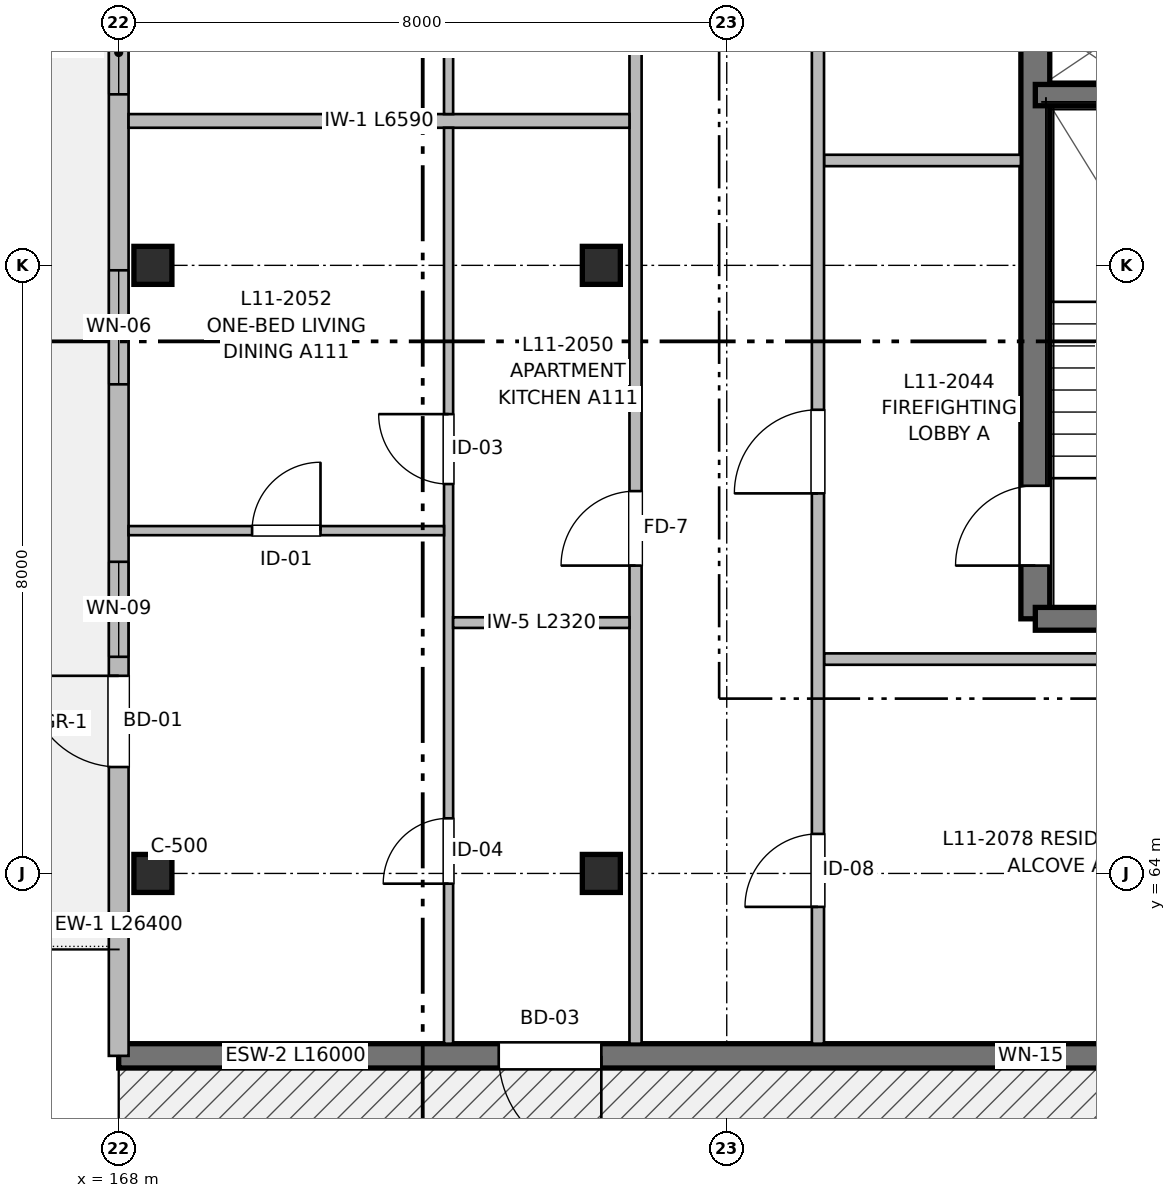
"""IFC4 building model, lengths in metres.
Left out: names, types, materials, properties, quantities, classifications, styles, units other than length and angle.
Written with IfcOpenShell. Run it as: python <this file> out.ifc"""

import sys

from ifc_helpers import new_model, si_unit, direction, frame, frame_2d, origin, origin_2d, place, context, subcontext, project, spatial, rectangle, extrude, element, fill, save


model = new_model("IFC4")
c1 = context("Model", 3, precision=1e-05, world=origin(), true_north=direction((0.0, 1.0)))
c2 = subcontext(c1, "Body", "Model", "MODEL_VIEW")
j1 = project(units=[si_unit("LENGTHUNIT", "METRE"), si_unit("PLANEANGLEUNIT", "RADIAN")], contexts=[c1])
p1 = place(None, origin())
s1 = spatial("IfcSite", under=j1, at=p1, CompositionType="ELEMENT")
p2 = place(p1, origin())
s2 = spatial("IfcBuilding", under=s1, at=p2, CompositionType="ELEMENT")
p3 = place(p2, frame((0.0, 0.0, 36.16)))
s3 = spatial("IfcBuildingStorey", under=s2, at=p3, CompositionType="ELEMENT", Elevation=36.16)
for number, where, z_axis, x_axis in (
    (1, (168.45, 64.0, 0.0), (0.0, 0.0, 1.0), (1.0, 0.0, 0.0)),
    (2, (168.45, 72.0, 0.0), (0.0, 0.0, 1.0), (1.0, 0.0, 0.0)),
    (3, (174.35, 64.0, 0.0), (0.0, 0.0, 1.0), (1.0, 0.0, 0.0)),
    (4, (174.35, 72.0, 0.0), (0.0, 0.0, 1.0), (1.0, 0.0, 0.0)),
):
    element("IfcColumn", number, at=place(p3, frame(where, z_axis=z_axis, x_axis=x_axis)), inside=s3, PredefinedType="COLUMN", context=c2, shape_type="SweptSolid", body=[
        extrude(rectangle(XDim=0.5, YDim=0.5, at=origin_2d()), origin(), (0.0, 0.0, 1.0), 3.2),
    ])
p4 = place(p3, frame((180.06, 67.35, 0.0), z_axis=(0.0, 0.0, 1.0), x_axis=(0.0, 1.0, 0.0)))
e5 = element("IfcWall", 5, at=p4, inside=s3, PredefinedType="SHEAR", context=c2, shape_type="SweptSolid", body=[
    extrude(rectangle(XDim=13.15, YDim=0.38, at=frame_2d((6.575, 0.0))), origin(), (0.0, 0.0, 1.0), 3.2),
])
p5 = place(p4, frame((0.7, 0.0, 0.0)))
e6 = element("IfcOpeningElement", 6, at=p5, cuts=e5, PredefinedType="OPENING", context=c2, shape_type="SweptSolid", body=[
    extrude(rectangle(XDim=1.05, YDim=2.15, at=frame_2d((0.525, 1.075))), frame((0.0, 0.2, 0.0), z_axis=(0.0, -1.0, 0.0), x_axis=(1.0, 0.0, 0.0)), (0.0, 0.0, 1.0), 0.4),
])
p6 = place(p3, frame((183.47, 67.35, 0.0), z_axis=(0.0, 0.0, 1.0), x_axis=(-1.0, 0.0, 0.0)))
e7 = element("IfcWall", 7, at=p6, inside=s3, PredefinedType="SHEAR", context=c2, shape_type="SweptSolid", body=[
    extrude(rectangle(XDim=3.41, YDim=0.3, at=frame_2d((1.705, 0.0))), origin(), (0.0, 0.0, 1.0), 3.2),
])
p7 = place(p3, frame((180.06, 74.24, 0.0), z_axis=(0.0, 0.0, 1.0), x_axis=(1.0, 0.0, 0.0)))
e8 = element("IfcWall", 8, at=p7, inside=s3, PredefinedType="SHEAR", context=c2, shape_type="SweptSolid", body=[
    extrude(rectangle(XDim=3.41, YDim=0.28, at=frame_2d((1.705, 0.0))), origin(), (0.0, 0.0, 1.0), 3.2),
])
p8 = place(p3, frame((184.0, 61.6, 0.0), z_axis=(0.0, 0.0, 1.0), x_axis=(-1.0, 0.0, 0.0)))
e9 = element("IfcWall", 9, at=p8, inside=s3, PredefinedType="SHEAR", context=c2, shape_type="SweptSolid", body=[
    extrude(rectangle(XDim=16.0, YDim=0.32, at=frame_2d((8.0, 0.0))), origin(), (0.0, 0.0, 1.0), 2.98),
])
p9 = place(p8, frame((9.65, 0.0, 0.0)))
e10 = element("IfcOpeningElement", 10, at=p9, cuts=e9, PredefinedType="OPENING", context=c2, shape_type="SweptSolid", body=[
    extrude(rectangle(XDim=1.35, YDim=2.2, at=frame_2d((0.675, 1.1))), frame((0.0, 0.17, 0.0), z_axis=(0.0, -1.0, 0.0), x_axis=(1.0, 0.0, 0.0)), (0.0, 0.0, 1.0), 0.34),
])
p10 = place(p8, frame((3.675, 0.0, 0.9)))
e11 = element("IfcOpeningElement", 11, at=p10, cuts=e9, PredefinedType="OPENING", context=c2, shape_type="SweptSolid", body=[
    extrude(rectangle(XDim=0.65, YDim=0.95, at=frame_2d((0.325, 0.475))), frame((0.0, 0.17, 0.0), z_axis=(0.0, -1.0, 0.0), x_axis=(1.0, 0.0, 0.0)), (0.0, 0.0, 1.0), 0.34),
])
p11 = place(p3, frame((168.0, 61.6, 0.0), z_axis=(0.0, 0.0, 1.0), x_axis=(0.0, 1.0, 0.0)))
e12 = element("IfcWall", 12, at=p11, inside=s3, PredefinedType="SOLIDWALL", context=c2, shape_type="SweptSolid", body=[
    extrude(rectangle(XDim=26.4, YDim=0.26, at=frame_2d((13.2, 0.0))), origin(), (0.0, 0.0, 1.0), 2.98),
])
p12 = place(p11, frame((3.8, 0.0, 0.0)))
e13 = element("IfcOpeningElement", 13, at=p12, cuts=e12, PredefinedType="OPENING", context=c2, shape_type="SweptSolid", body=[
    extrude(rectangle(XDim=1.2, YDim=2.2, at=frame_2d((0.6, 1.1))), frame((0.0, 0.14, 0.0), z_axis=(0.0, -1.0, 0.0), x_axis=(1.0, 0.0, 0.0)), (0.0, 0.0, 1.0), 0.28),
])
p13 = place(p11, frame((5.25, 0.0, 0.87)))
e14 = element("IfcOpeningElement", 14, at=p13, cuts=e12, PredefinedType="OPENING", context=c2, shape_type="SweptSolid", body=[
    extrude(rectangle(XDim=1.25, YDim=1.35, at=frame_2d((0.625, 0.675))), frame((0.0, 0.14, 0.0), z_axis=(0.0, -1.0, 0.0), x_axis=(1.0, 0.0, 0.0)), (0.0, 0.0, 1.0), 0.28),
])
p14 = place(p11, frame((12.65, 0.0, 0.62)))
e15 = element("IfcOpeningElement", 15, at=p14, cuts=e12, PredefinedType="OPENING", context=c2, shape_type="SweptSolid", body=[
    extrude(rectangle(XDim=1.1, YDim=1.6, at=frame_2d((0.55, 0.8))), frame((0.0, 0.14, 0.0), z_axis=(0.0, -1.0, 0.0), x_axis=(1.0, 0.0, 0.0)), (0.0, 0.0, 1.0), 0.28),
])
p15 = place(p11, frame((21.5, 0.0, 0.47)))
e16 = element("IfcOpeningElement", 16, at=p15, cuts=e12, PredefinedType="OPENING", context=c2, shape_type="SweptSolid", body=[
    extrude(rectangle(XDim=2.7, YDim=1.75, at=frame_2d((1.35, 0.875))), frame((0.0, 0.14, 0.0), z_axis=(0.0, -1.0, 0.0), x_axis=(1.0, 0.0, 0.0)), (0.0, 0.0, 1.0), 0.28),
])
p16 = place(p11, frame((8.835, 0.0, 0.82)))
e17 = element("IfcOpeningElement", 17, at=p16, cuts=e12, PredefinedType="OPENING", context=c2, shape_type="SweptSolid", body=[
    extrude(rectangle(XDim=1.5, YDim=1.4, at=frame_2d((0.75, 0.7))), frame((0.0, 0.14, 0.0), z_axis=(0.0, -1.0, 0.0), x_axis=(1.0, 0.0, 0.0)), (0.0, 0.0, 1.0), 0.28),
])
p17 = place(p11, frame((17.97, 0.0, 0.82)))
e18 = element("IfcOpeningElement", 18, at=p17, cuts=e12, PredefinedType="OPENING", context=c2, shape_type="SweptSolid", body=[
    extrude(rectangle(XDim=1.5, YDim=1.4, at=frame_2d((0.75, 0.7))), frame((0.0, 0.14, 0.0), z_axis=(0.0, -1.0, 0.0), x_axis=(1.0, 0.0, 0.0)), (0.0, 0.0, 1.0), 0.28),
])
p18 = place(p11, frame((25.275, 0.0, 0.9)))
e19 = element("IfcOpeningElement", 19, at=p18, cuts=e12, PredefinedType="OPENING", context=c2, shape_type="SweptSolid", body=[
    extrude(rectangle(XDim=0.65, YDim=0.95, at=frame_2d((0.325, 0.475))), frame((0.0, 0.14, 0.0), z_axis=(0.0, -1.0, 0.0), x_axis=(1.0, 0.0, 0.0)), (0.0, 0.0, 1.0), 0.28),
])
p19 = place(p3, frame((177.28, 66.82, 0.0), z_axis=(0.0, 0.0, 1.0), x_axis=(1.0, 0.0, 0.0)))
e20 = element("IfcWall", 20, at=p19, inside=s3, PredefinedType="PARTITIONING", context=c2, shape_type="SweptSolid", body=[
    extrude(rectangle(XDim=6.59, YDim=0.15, at=frame_2d((3.295, 0.0))), origin(), (0.0, 0.0, 1.0), 2.935),
])
p20 = place(p3, frame((177.28, 73.38, 0.0), z_axis=(0.0, 0.0, 1.0), x_axis=(1.0, 0.0, 0.0)))
e21 = element("IfcWall", 21, at=p20, inside=s3, PredefinedType="PARTITIONING", context=c2, shape_type="SweptSolid", body=[
    extrude(rectangle(XDim=2.59, YDim=0.15, at=frame_2d((1.295, 0.0))), origin(), (0.0, 0.0, 1.0), 2.935),
])
p21 = place(p3, frame((174.8, 61.76, 0.0), z_axis=(0.0, 0.0, 1.0), x_axis=(0.0, 1.0, 0.0)))
e22 = element("IfcWall", 22, at=p21, inside=s3, PredefinedType="PARTITIONING", context=c2, shape_type="SweptSolid", body=[
    extrude(rectangle(XDim=45.04, YDim=0.16, at=frame_2d((22.52, 0.0))), origin(), (0.0, 0.0, 1.0), 2.935),
])
p22 = place(p21, frame((6.29, 0.0, 0.0)))
e23 = element("IfcOpeningElement", 23, at=p22, cuts=e22, PredefinedType="OPENING", context=c2, shape_type="SweptSolid", body=[
    extrude(rectangle(XDim=0.98, YDim=2.15, at=frame_2d((0.49, 1.075))), frame((0.0, 0.09, 0.0), z_axis=(0.0, -1.0, 0.0), x_axis=(1.0, 0.0, 0.0)), (0.0, 0.0, 1.0), 0.18),
])
p23 = place(p21, frame((19.09, 0.0, 0.0)))
e24 = element("IfcOpeningElement", 24, at=p23, cuts=e22, PredefinedType="OPENING", context=c2, shape_type="SweptSolid", body=[
    extrude(rectangle(XDim=1.02, YDim=2.15, at=frame_2d((0.51, 1.075))), frame((0.0, 0.09, 0.0), z_axis=(0.0, -1.0, 0.0), x_axis=(1.0, 0.0, 0.0)), (0.0, 0.0, 1.0), 0.18),
])
p24 = place(p21, frame((30.04, 0.0, 0.0)))
e25 = element("IfcOpeningElement", 25, at=p24, cuts=e22, PredefinedType="OPENING", context=c2, shape_type="SweptSolid", body=[
    extrude(rectangle(XDim=0.98, YDim=2.15, at=frame_2d((0.49, 1.075))), frame((0.0, 0.09, 0.0), z_axis=(0.0, -1.0, 0.0), x_axis=(1.0, 0.0, 0.0)), (0.0, 0.0, 1.0), 0.18),
])
p25 = place(p21, frame((40.18, 0.0, 0.0)))
e26 = element("IfcOpeningElement", 26, at=p25, cuts=e22, PredefinedType="OPENING", context=c2, shape_type="SweptSolid", body=[
    extrude(rectangle(XDim=0.98, YDim=2.15, at=frame_2d((0.49, 1.075))), frame((0.0, 0.09, 0.0), z_axis=(0.0, -1.0, 0.0), x_axis=(1.0, 0.0, 0.0)), (0.0, 0.0, 1.0), 0.18),
])
p26 = place(p3, frame((177.2, 61.76, 0.0), z_axis=(0.0, 0.0, 1.0), x_axis=(0.0, 1.0, 0.0)))
e27 = element("IfcWall", 27, at=p26, inside=s3, PredefinedType="PARTITIONING", context=c2, shape_type="SweptSolid", body=[
    extrude(rectangle(XDim=45.04, YDim=0.16, at=frame_2d((22.52, 0.0))), origin(), (0.0, 0.0, 1.0), 2.935),
])
p27 = place(p26, frame((7.24, 0.0, 0.0)))
e28 = element("IfcOpeningElement", 28, at=p27, cuts=e27, PredefinedType="OPENING", context=c2, shape_type="SweptSolid", body=[
    extrude(rectangle(XDim=1.1, YDim=2.15, at=frame_2d((0.55, 1.075))), frame((0.0, 0.09, 0.0), z_axis=(0.0, -1.0, 0.0), x_axis=(1.0, 0.0, 0.0)), (0.0, 0.0, 1.0), 0.18),
])
p28 = place(p26, frame((13.64, 0.0, 0.0)))
e29 = element("IfcOpeningElement", 29, at=p28, cuts=e27, PredefinedType="OPENING", context=c2, shape_type="SweptSolid", body=[
    extrude(rectangle(XDim=1.6, YDim=2.15, at=frame_2d((0.8, 1.075))), frame((0.0, 0.09, 0.0), z_axis=(0.0, -1.0, 0.0), x_axis=(1.0, 0.0, 0.0)), (0.0, 0.0, 1.0), 0.18),
])
p29 = place(p26, frame((1.8, 0.0, 0.0)))
e30 = element("IfcOpeningElement", 30, at=p29, cuts=e27, PredefinedType="OPENING", context=c2, shape_type="SweptSolid", body=[
    extrude(rectangle(XDim=0.96, YDim=2.15, at=frame_2d((0.48, 1.075))), frame((0.0, 0.09, 0.0), z_axis=(0.0, -1.0, 0.0), x_axis=(1.0, 0.0, 0.0)), (0.0, 0.0, 1.0), 0.18),
])
p30 = place(p26, frame((27.57, 0.0, 0.0)))
e31 = element("IfcOpeningElement", 31, at=p30, cuts=e27, PredefinedType="OPENING", context=c2, shape_type="SweptSolid", body=[
    extrude(rectangle(XDim=0.98, YDim=2.15, at=frame_2d((0.49, 1.075))), frame((0.0, 0.09, 0.0), z_axis=(0.0, -1.0, 0.0), x_axis=(1.0, 0.0, 0.0)), (0.0, 0.0, 1.0), 0.18),
])
p31 = place(p26, frame((35.83, 0.0, 0.0)))
e32 = element("IfcOpeningElement", 32, at=p31, cuts=e27, PredefinedType="OPENING", context=c2, shape_type="SweptSolid", body=[
    extrude(rectangle(XDim=0.98, YDim=2.15, at=frame_2d((0.49, 1.075))), frame((0.0, 0.09, 0.0), z_axis=(0.0, -1.0, 0.0), x_axis=(1.0, 0.0, 0.0)), (0.0, 0.0, 1.0), 0.18),
])
p32 = place(p3, frame((168.13, 73.9, 0.0), z_axis=(0.0, 0.0, 1.0), x_axis=(1.0, 0.0, 0.0)))
e33 = element("IfcWall", 33, at=p32, inside=s3, PredefinedType="PARTITIONING", context=c2, shape_type="SweptSolid", body=[
    extrude(rectangle(XDim=6.59, YDim=0.18, at=frame_2d((3.295, 0.0))), origin(), (0.0, 0.0, 1.0), 2.935),
])
p33 = place(p3, frame((172.34, 61.76, 0.0), z_axis=(0.0, 0.0, 1.0), x_axis=(0.0, 1.0, 0.0)))
e34 = element("IfcWall", 34, at=p33, inside=s3, PredefinedType="PARTITIONING", context=c2, shape_type="SweptSolid", body=[
    extrude(rectangle(XDim=12.05, YDim=0.12, at=frame_2d((6.025, 0.0))), origin(), (0.0, 0.0, 1.0), 2.935),
])
p34 = place(p33, frame((2.105, 0.0, 0.0)))
e35 = element("IfcOpeningElement", 35, at=p34, cuts=e34, PredefinedType="OPENING", context=c2, shape_type="SweptSolid", body=[
    extrude(rectangle(XDim=0.86, YDim=2.1, at=frame_2d((0.43, 1.05))), frame((0.0, 0.07, 0.0), z_axis=(0.0, -1.0, 0.0), x_axis=(1.0, 0.0, 0.0)), (0.0, 0.0, 1.0), 0.14),
])
p35 = place(p33, frame((7.363, 0.0, 0.0)))
e36 = element("IfcOpeningElement", 36, at=p35, cuts=e34, PredefinedType="OPENING", context=c2, shape_type="SweptSolid", body=[
    extrude(rectangle(XDim=0.92, YDim=2.1, at=frame_2d((0.46, 1.05))), frame((0.0, 0.07, 0.0), z_axis=(0.0, -1.0, 0.0), x_axis=(1.0, 0.0, 0.0)), (0.0, 0.0, 1.0), 0.14),
])
p36 = place(p3, frame((172.4, 67.3, 0.0), z_axis=(0.0, 0.0, 1.0), x_axis=(1.0, 0.0, 0.0)))
e37 = element("IfcWall", 37, at=p36, inside=s3, PredefinedType="PARTITIONING", context=c2, shape_type="SweptSolid", body=[
    extrude(rectangle(XDim=2.32, YDim=0.14, at=frame_2d((1.16, 0.0))), origin(), (0.0, 0.0, 1.0), 2.935),
])
p37 = place(p3, frame((168.13, 68.51, 0.0), z_axis=(0.0, 0.0, 1.0), x_axis=(1.0, 0.0, 0.0)))
e38 = element("IfcWall", 38, at=p37, inside=s3, PredefinedType="PARTITIONING", context=c2, shape_type="SweptSolid", body=[
    extrude(rectangle(XDim=4.15, YDim=0.12, at=frame_2d((2.075, 0.0))), origin(), (0.0, 0.0, 1.0), 2.935),
])
p38 = place(p37, frame((1.625, 0.0, 0.0)))
e39 = element("IfcOpeningElement", 39, at=p38, cuts=e38, PredefinedType="OPENING", context=c2, shape_type="SweptSolid", body=[
    extrude(rectangle(XDim=0.9, YDim=2.1, at=frame_2d((0.45, 1.05))), frame((0.0, 0.07, 0.0), z_axis=(0.0, -1.0, 0.0), x_axis=(1.0, 0.0, 0.0)), (0.0, 0.0, 1.0), 0.14),
])
p39 = place(p3, frame((172.34, 73.99, 0.0), z_axis=(0.0, 0.0, 1.0), x_axis=(0.0, 1.0, 0.0)))
e40 = element("IfcWall", 40, at=p39, inside=s3, PredefinedType="PARTITIONING", context=c2, shape_type="SweptSolid", body=[
    extrude(rectangle(XDim=12.41, YDim=0.12, at=frame_2d((6.205, 0.0))), origin(), (0.0, 0.0, 1.0), 2.935),
])
p40 = place(p39, frame((2.17, 0.0, 0.0)))
e41 = element("IfcOpeningElement", 41, at=p40, cuts=e40, PredefinedType="OPENING", context=c2, shape_type="SweptSolid", body=[
    extrude(rectangle(XDim=0.94, YDim=2.1, at=frame_2d((0.47, 1.05))), frame((0.0, 0.07, 0.0), z_axis=(0.0, -1.0, 0.0), x_axis=(1.0, 0.0, 0.0)), (0.0, 0.0, 1.0), 0.14),
])
p41 = place(p39, frame((7.586, 0.0, 0.0)))
e42 = element("IfcOpeningElement", 42, at=p41, cuts=e40, PredefinedType="OPENING", context=c2, shape_type="SweptSolid", body=[
    extrude(rectangle(XDim=0.92, YDim=2.1, at=frame_2d((0.46, 1.05))), frame((0.0, 0.07, 0.0), z_axis=(0.0, -1.0, 0.0), x_axis=(1.0, 0.0, 0.0)), (0.0, 0.0, 1.0), 0.14),
])
p42 = place(p5, origin())
e43 = element("IfcDoor", 43, at=p42, inside=s3, OperationType="SINGLE_SWING_LEFT", PredefinedType="DOOR", context=c2, shape_type="SweptSolid", body=[
    extrude(rectangle(XDim=1.05, YDim=2.15, at=frame_2d((0.525, 1.075))), frame((0.0, 0.025, 0.0), z_axis=(0.0, -1.0, 0.0), x_axis=(1.0, 0.0, 0.0)), (0.0, 0.0, 1.0), 0.05),
])
fill(e6, e43)
p43 = place(p9, origin())
e44 = element("IfcDoor", 44, at=p43, inside=s3, OperationType="SINGLE_SWING_LEFT", PredefinedType="DOOR", context=c2, shape_type="SweptSolid", body=[
    extrude(rectangle(XDim=1.35, YDim=2.2, at=frame_2d((0.675, 1.1))), frame((0.0, 0.025, 0.0), z_axis=(0.0, -1.0, 0.0), x_axis=(1.0, 0.0, 0.0)), (0.0, 0.0, 1.0), 0.05),
])
fill(e10, e44)
p44 = place(p10, origin())
e45 = element("IfcWindow", 45, at=p44, inside=s3, PartitioningType="SINGLE_PANEL", PredefinedType="WINDOW", context=c2, shape_type="SweptSolid", body=[
    extrude(rectangle(XDim=0.65, YDim=0.95, at=frame_2d((0.325, 0.475))), frame((0.0, 0.03, 0.0), z_axis=(0.0, -1.0, 0.0), x_axis=(1.0, 0.0, 0.0)), (0.0, 0.0, 1.0), 0.06),
])
fill(e11, e45)
p45 = place(p12, origin())
e46 = element("IfcDoor", 46, at=p45, inside=s3, OperationType="SINGLE_SWING_RIGHT", PredefinedType="DOOR", context=c2, shape_type="SweptSolid", body=[
    extrude(rectangle(XDim=1.2, YDim=2.2, at=frame_2d((0.6, 1.1))), frame((0.0, 0.025, 0.0), z_axis=(0.0, -1.0, 0.0), x_axis=(1.0, 0.0, 0.0)), (0.0, 0.0, 1.0), 0.05),
])
fill(e13, e46)
p46 = place(p13, origin())
e47 = element("IfcWindow", 47, at=p46, inside=s3, PartitioningType="SINGLE_PANEL", PredefinedType="WINDOW", context=c2, shape_type="SweptSolid", body=[
    extrude(rectangle(XDim=1.25, YDim=1.35, at=frame_2d((0.625, 0.675))), frame((0.0, 0.03, 0.0), z_axis=(0.0, -1.0, 0.0), x_axis=(1.0, 0.0, 0.0)), (0.0, 0.0, 1.0), 0.06),
])
fill(e14, e47)
p47 = place(p14, origin())
e48 = element("IfcWindow", 48, at=p47, inside=s3, PartitioningType="SINGLE_PANEL", PredefinedType="WINDOW", context=c2, shape_type="SweptSolid", body=[
    extrude(rectangle(XDim=1.1, YDim=1.6, at=frame_2d((0.55, 0.8))), frame((0.0, 0.03, 0.0), z_axis=(0.0, -1.0, 0.0), x_axis=(1.0, 0.0, 0.0)), (0.0, 0.0, 1.0), 0.06),
])
fill(e15, e48)
p48 = place(p27, origin())
e49 = element("IfcDoor", 49, at=p48, inside=s3, OperationType="SINGLE_SWING_LEFT", PredefinedType="DOOR", context=c2, shape_type="SweptSolid", body=[
    extrude(rectangle(XDim=1.1, YDim=2.15, at=frame_2d((0.55, 1.075))), frame((0.0, 0.025, 0.0), z_axis=(0.0, -1.0, 0.0), x_axis=(1.0, 0.0, 0.0)), (0.0, 0.0, 1.0), 0.05),
])
fill(e28, e49)
p49 = place(p34, origin())
e50 = element("IfcDoor", 50, at=p49, inside=s3, OperationType="SINGLE_SWING_LEFT", PredefinedType="DOOR", context=c2, shape_type="SweptSolid", body=[
    extrude(rectangle(XDim=0.86, YDim=2.1, at=frame_2d((0.43, 1.05))), frame((0.0, 0.025, 0.0), z_axis=(0.0, -1.0, 0.0), x_axis=(1.0, 0.0, 0.0)), (0.0, 0.0, 1.0), 0.05),
])
fill(e35, e50)
p50 = place(p35, origin())
e51 = element("IfcDoor", 51, at=p50, inside=s3, OperationType="SINGLE_SWING_RIGHT", PredefinedType="DOOR", context=c2, shape_type="SweptSolid", body=[
    extrude(rectangle(XDim=0.92, YDim=2.1, at=frame_2d((0.46, 1.05))), frame((0.0, 0.025, 0.0), z_axis=(0.0, -1.0, 0.0), x_axis=(1.0, 0.0, 0.0)), (0.0, 0.0, 1.0), 0.05),
])
fill(e36, e51)
p51 = place(p22, origin())
e52 = element("IfcDoor", 52, at=p51, inside=s3, OperationType="SINGLE_SWING_LEFT", PredefinedType="DOOR", context=c2, shape_type="SweptSolid", body=[
    extrude(rectangle(XDim=0.98, YDim=2.15, at=frame_2d((0.49, 1.075))), frame((0.0, 0.025, 0.0), z_axis=(0.0, -1.0, 0.0), x_axis=(1.0, 0.0, 0.0)), (0.0, 0.0, 1.0), 0.05),
])
fill(e23, e52)
p52 = place(p38, origin())
e53 = element("IfcDoor", 53, at=p52, inside=s3, OperationType="SINGLE_SWING_RIGHT", PredefinedType="DOOR", context=c2, shape_type="SweptSolid", body=[
    extrude(rectangle(XDim=0.9, YDim=2.1, at=frame_2d((0.45, 1.05))), frame((0.0, 0.025, 0.0), z_axis=(0.0, -1.0, 0.0), x_axis=(1.0, 0.0, 0.0)), (0.0, 0.0, 1.0), 0.05),
])
fill(e39, e53)
p53 = place(p29, origin())
e54 = element("IfcDoor", 54, at=p53, inside=s3, OperationType="SINGLE_SWING_LEFT", PredefinedType="DOOR", context=c2, shape_type="SweptSolid", body=[
    extrude(rectangle(XDim=0.96, YDim=2.15, at=frame_2d((0.48, 1.075))), frame((0.0, 0.025, 0.0), z_axis=(0.0, -1.0, 0.0), x_axis=(1.0, 0.0, 0.0)), (0.0, 0.0, 1.0), 0.05),
])
fill(e30, e54)
p54 = place(p16, origin())
e55 = element("IfcWindow", 55, at=p54, inside=s3, PartitioningType="SINGLE_PANEL", PredefinedType="WINDOW", context=c2, shape_type="SweptSolid", body=[
    extrude(rectangle(XDim=1.5, YDim=1.4, at=frame_2d((0.75, 0.7))), frame((0.0, 0.03, 0.0), z_axis=(0.0, -1.0, 0.0), x_axis=(1.0, 0.0, 0.0)), (0.0, 0.0, 1.0), 0.06),
])
fill(e17, e55)
save(model, sys.argv[1])
